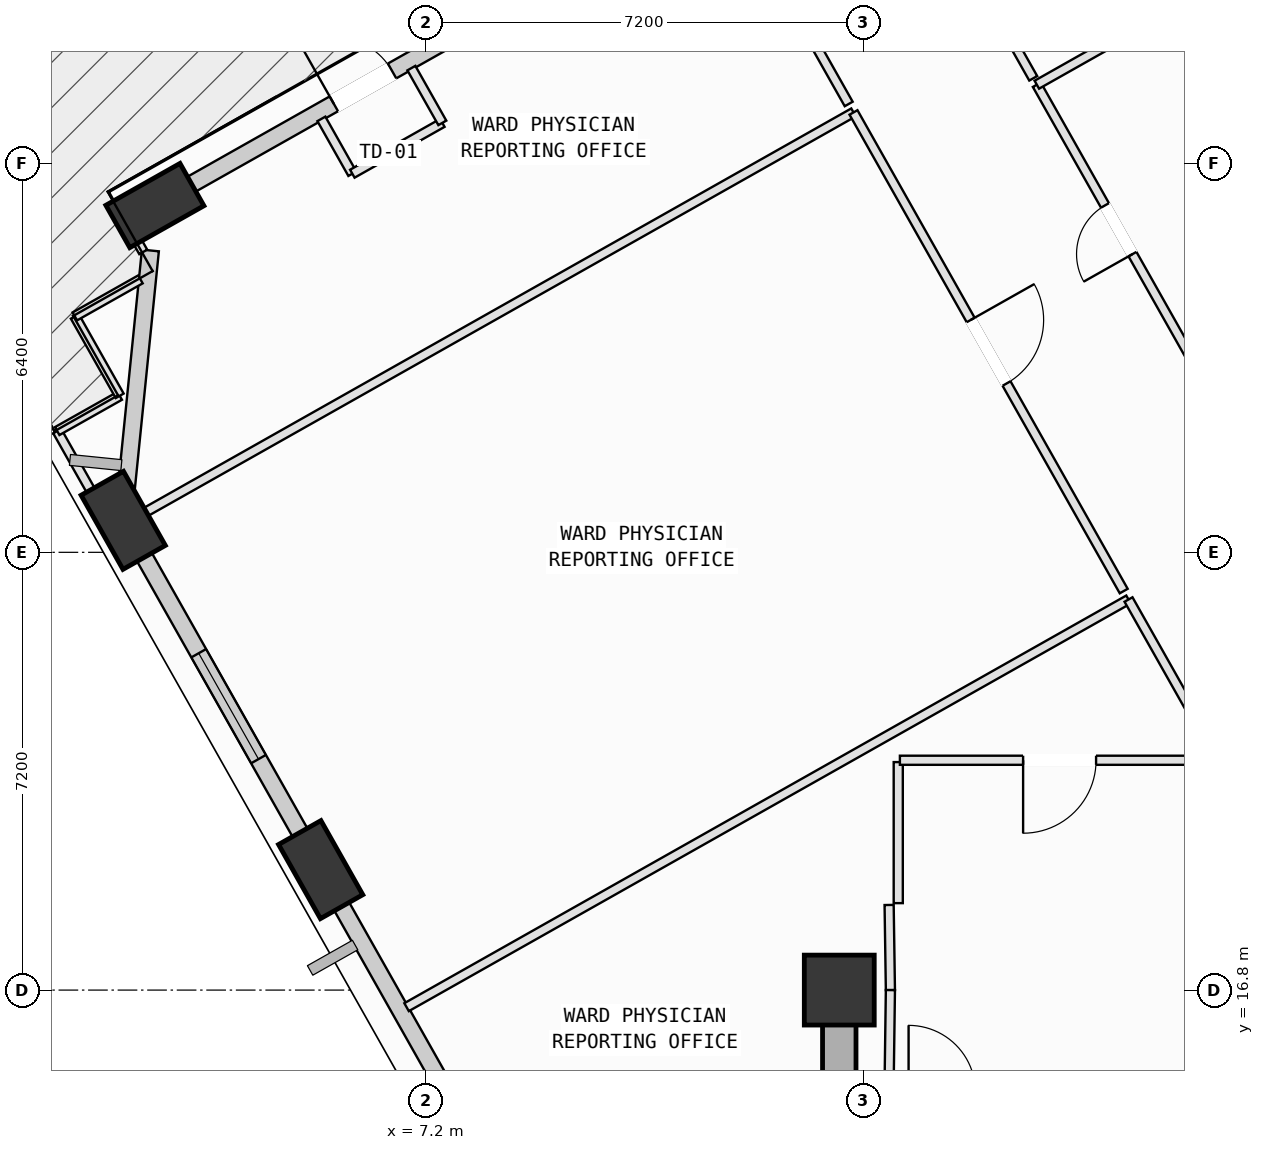
"""IFC4 building model, lengths in metres.
Left out: names, types, materials, properties, quantities, classifications, styles, units other than length and angle.
Written with IfcOpenShell. Run it as: python <this file> out.ifc"""

import sys

from ifc_helpers import new_model, si_unit, direction, frame, frame_2d, origin, origin_2d, place, context, subcontext, project, spatial, rectangle, extrude, element, fill, save


model = new_model("IFC4")
c1 = context("Model", 3, precision=1e-05, world=origin(), true_north=direction((0.0, 1.0)))
c2 = subcontext(c1, "Body", "Model", "MODEL_VIEW")
j1 = project(units=[si_unit("LENGTHUNIT", "METRE"), si_unit("PLANEANGLEUNIT", "RADIAN")], contexts=[c1])
p1 = place(None, origin())
s1 = spatial("IfcSite", under=j1, at=p1, CompositionType="ELEMENT")
p2 = place(p1, origin())
s2 = spatial("IfcBuilding", under=s1, at=p2, CompositionType="ELEMENT")
p3 = place(p2, frame((0.0, 0.0, 149.8)))
s3 = spatial("IfcBuildingStorey", under=s2, at=p3, CompositionType="ELEMENT", Elevation=149.8)
p4 = place(p3, frame((14.0, 16.8, 0.0), z_axis=(0.0, 0.0, 1.0), x_axis=(1.0, 0.0, 0.0)))
e1 = element("IfcColumn", 1, at=p4, inside=s3, PredefinedType="COLUMN", context=c2, shape_type="SweptSolid", body=[
    extrude(rectangle(XDim=1.15, YDim=1.15, at=origin_2d()), origin(), (0.0, 0.0, 1.0), 4.0),
])
p5 = place(p3, frame((2.745, 29.704, 0.091), z_axis=(-0.019150191055, -0.126986218353, 0.991719602776), x_axis=(0.933758447221, 0.352290278892, 0.063140491291)))
e2 = element("IfcColumn", 2, at=p5, inside=s3, PredefinedType="COLUMN", context=c2, shape_type="SweptSolid", body=[
    extrude(rectangle(XDim=1.4, YDim=0.8, at=origin_2d()), origin(), (0.0, 0.0, 1.0), 3.939),
])
p6 = place(p3, frame((2.224, 24.526, 0.106), z_axis=(0.002115181882, -0.128963883582, 0.991647035359), x_axis=(-0.505758577121, 0.855332460621, 0.112314929893)))
e3 = element("IfcColumn", 3, at=p6, inside=s3, PredefinedType="COLUMN", context=c2, shape_type="SweptSolid", body=[
    extrude(rectangle(XDim=1.4, YDim=0.8, at=origin_2d()), origin(), (0.0, 0.0, 1.0), 3.924),
])
p7 = place(p3, frame((5.471, 18.781, 0.098), z_axis=(0.025670958189, -0.115612547775, 0.992962607908), x_axis=(-0.667400379772, 0.737524132822, 0.103125586472)))
e4 = element("IfcColumn", 4, at=p7, inside=s3, PredefinedType="COLUMN", context=c2, shape_type="SweptSolid", body=[
    extrude(rectangle(XDim=1.4, YDim=0.8, at=origin_2d()), origin(), (0.0, 0.0, 1.0), 3.928),
])
p8 = place(p3, frame((3.001, 29.86, 0.0), z_axis=(0.0, 0.0, 1.0), x_axis=(0.87078604554, 0.491662143033, 0.0)))
e5 = element("IfcWall", 5, at=p8, inside=s3, PredefinedType="SOLIDWALL", context=c2, shape_type="SweptSolid", body=[
    extrude(rectangle(XDim=7.27, YDim=0.28, at=frame_2d((3.635, 0.0))), origin(), (0.0, 0.0, 1.0), 3.165),
])
p9 = place(p8, frame((3.085, 0.0, 0.0)))
e6 = element("IfcOpeningElement", 6, at=p9, cuts=e5, PredefinedType="OPENING", context=c2, shape_type="SweptSolid", body=[
    extrude(rectangle(XDim=1.1, YDim=2.15, at=frame_2d((0.55, 1.075))), frame((0.0, 0.15, 0.0), z_axis=(0.0, -1.0, 0.0), x_axis=(1.0, 0.0, 0.0)), (0.0, 0.0, 1.0), 0.3),
])
p10 = place(p3, frame((2.248, 24.775, 0.0), z_axis=(0.0, 0.0, 1.0), x_axis=(0.100485371099, 0.994938535888, 0.0)))
e7 = element("IfcWall", 7, at=p10, inside=s3, PredefinedType="SOLIDWALL", context=c2, shape_type="SweptSolid", body=[
    extrude(rectangle(XDim=4.21, YDim=0.28, at=frame_2d((2.105, 0.0))), origin(), (0.0, 0.0, 1.0), 3.165),
])
p11 = place(p3, frame((5.339, 19.022, 0.0), z_axis=(0.0, 0.0, 1.0), x_axis=(-0.49164265264, 0.870797049894, 0.0)))
e8 = element("IfcWall", 8, at=p11, inside=s3, PredefinedType="SOLIDWALL", context=c2, shape_type="SweptSolid", body=[
    extrude(rectangle(XDim=5.628, YDim=0.28, at=frame_2d((2.814, 0.0))), origin(), (0.0, 0.0, 1.0), 3.165),
])
p12 = place(p11, frame((1.811, 0.0, 0.75)))
e9 = element("IfcOpeningElement", 9, at=p12, cuts=e8, PredefinedType="OPENING", context=c2, shape_type="SweptSolid", body=[
    extrude(rectangle(XDim=2.0, YDim=1.95, at=frame_2d((1.0, 0.975))), frame((0.0, 0.15, 0.0), z_axis=(0.0, -1.0, 0.0), x_axis=(1.0, 0.0, 0.0)), (0.0, 0.0, 1.0), 0.3),
])
p13 = place(p3, frame((8.606, 13.236, 0.0), z_axis=(0.0, 0.0, 1.0), x_axis=(-0.491646579906, 0.870794832591, 0.0)))
e10 = element("IfcWall", 10, at=p13, inside=s3, PredefinedType="SOLIDWALL", context=c2, shape_type="SweptSolid", body=[
    extrude(rectangle(XDim=5.662, YDim=0.28, at=frame_2d((2.831, 0.0))), origin(), (0.0, 0.0, 1.0), 3.165),
])
p14 = place(p13, frame((1.048, 0.0, 0.75)))
e11 = element("IfcOpeningElement", 11, at=p14, cuts=e10, PredefinedType="OPENING", context=c2, shape_type="SweptSolid", body=[
    extrude(rectangle(XDim=1.4, YDim=1.85, at=frame_2d((0.7, 0.925))), frame((0.0, 0.15, 0.0), z_axis=(0.0, -1.0, 0.0), x_axis=(1.0, 0.0, 0.0)), (0.0, 0.0, 1.0), 0.3),
])
p15 = place(p3, frame((14.0, 16.8, 0.0), z_axis=(0.0, 0.0, 1.0), x_axis=(0.0, -1.0, 0.0)))
e12 = element("IfcWall", 12, at=p15, inside=s3, PredefinedType="SHEAR", context=c2, shape_type="SweptSolid", body=[
    extrude(rectangle(XDim=9.0, YDim=0.55, at=frame_2d((4.5, 0.0))), origin(), (0.0, 0.0, 1.0), 3.78),
])
p16 = place(p3, frame((14.97, 20.55, 0.0), z_axis=(0.0, 0.0, 1.0), x_axis=(0.0, -1.0, 0.0)))
e13 = element("IfcWall", 13, at=p16, inside=s3, PredefinedType="PARTITIONING", context=c2, shape_type="SweptSolid", body=[
    extrude(rectangle(XDim=2.32, YDim=0.15, at=frame_2d((1.16, 0.0))), origin(), (0.0, 0.0, 1.0), 2.765),
])
p17 = place(p3, frame((14.82, 18.2, 0.0), z_axis=(0.0, 0.0, 1.0), x_axis=(0.01499656939, -0.99988754513, 0.0)))
e14 = element("IfcWall", 14, at=p17, inside=s3, PredefinedType="PARTITIONING", context=c2, shape_type="SweptSolid", body=[
    extrude(rectangle(XDim=1.4, YDim=0.15, at=frame_2d((0.7, 0.0))), origin(), (0.0, 0.0, 1.0), 3.78),
])
p18 = place(p3, frame((14.841, 16.8, 0.0), z_axis=(0.0, 0.0, 1.0), x_axis=(-0.01363221443, -0.999907077048, 0.0)))
e15 = element("IfcWall", 15, at=p18, inside=s3, PredefinedType="PARTITIONING", context=c2, shape_type="SweptSolid", body=[
    extrude(rectangle(XDim=1.54, YDim=0.15, at=frame_2d((0.77, 0.0))), origin(), (0.0, 0.0, 1.0), 3.78),
])
p19 = place(p3, frame((6.884, 16.519, 0.0), z_axis=(0.0, 0.0, 1.0), x_axis=(0.870744187076, 0.491736271464, 0.0)))
e16 = element("IfcWall", 16, at=p19, inside=s3, PredefinedType="PARTITIONING", context=c2, shape_type="SweptSolid", body=[
    extrude(rectangle(XDim=13.635, YDim=0.15, at=frame_2d((6.818, 0.0))), origin(), (0.0, 0.0, 1.0), 3.78),
])
p20 = place(p3, frame((18.757, 23.224, 0.0), z_axis=(0.0, 0.0, 1.0), x_axis=(0.491673041497, -0.870779891973, 0.0)))
e17 = element("IfcWall", 17, at=p20, inside=s3, PredefinedType="PARTITIONING", context=c2, shape_type="SweptSolid", body=[
    extrude(rectangle(XDim=3.036, YDim=0.15, at=frame_2d((1.518, 0.0))), origin(), (0.0, 0.0, 1.0), 3.78),
])
p21 = place(p3, frame((20.25, 20.58, 0.0), z_axis=(0.0, 0.0, 1.0), x_axis=(-1.0, 0.0, 0.0)))
e18 = element("IfcWall", 18, at=p21, inside=s3, PredefinedType="PARTITIONING", context=c2, shape_type="SweptSolid", body=[
    extrude(rectangle(XDim=5.253, YDim=0.15, at=frame_2d((2.626, 0.0))), origin(), (0.0, 0.0, 1.0), 3.78),
])
p22 = place(p21, frame((2.027, 0.0, 0.0)))
e19 = element("IfcOpeningElement", 19, at=p22, cuts=e18, PredefinedType="OPENING", context=c2, shape_type="SweptSolid", body=[
    extrude(rectangle(XDim=1.2, YDim=2.15, at=frame_2d((0.6, 1.075))), frame((0.0, 0.085, 0.0), z_axis=(0.0, -1.0, 0.0), x_axis=(1.0, 0.0, 0.0)), (0.0, 0.0, 1.0), 0.17),
])
p23 = place(p3, frame((2.06, 24.361, 0.0), z_axis=(0.0, 0.0, 1.0), x_axis=(0.870772215096, 0.491686637419, 0.0)))
e20 = element("IfcWall", 20, at=p23, inside=s3, PredefinedType="PARTITIONING", context=c2, shape_type="SweptSolid", body=[
    extrude(rectangle(XDim=13.98, YDim=0.15, at=frame_2d((6.99, 0.0))), origin(), (0.0, 0.0, 1.0), 3.78),
])
p24 = place(p3, frame((14.234, 31.235, 0.0), z_axis=(0.0, 0.0, 1.0), x_axis=(0.491609563099, -0.870815731065, 0.0)))
e21 = element("IfcWall", 21, at=p24, inside=s3, PredefinedType="PARTITIONING", context=c2, shape_type="SweptSolid", body=[
    extrude(rectangle(XDim=9.04, YDim=0.15, at=frame_2d((4.52, 0.0))), origin(), (0.0, 0.0, 1.0), 3.78),
])
p25 = place(p24, frame((3.92, 0.0, 0.0)))
e22 = element("IfcOpeningElement", 22, at=p25, cuts=e21, PredefinedType="OPENING", context=c2, shape_type="SweptSolid", body=[
    extrude(rectangle(XDim=1.2, YDim=2.15, at=frame_2d((0.6, 1.075))), frame((0.0, 0.085, 0.0), z_axis=(0.0, -1.0, 0.0), x_axis=(1.0, 0.0, 0.0)), (0.0, 0.0, 1.0), 0.17),
])
p26 = place(p3, frame((5.622, 18.053, 0.0), z_axis=(0.0, 0.0, 1.0), x_axis=(-0.491557910724, 0.870844888832, 0.0)))
e23 = element("IfcWall", 23, at=p26, inside=s3, PredefinedType="PARTITIONING", context=c2, shape_type="SweptSolid", body=[
    extrude(rectangle(XDim=0.983, YDim=0.15, at=frame_2d((0.491, 0.0))), origin(), (0.0, 0.0, 1.0), 3.165),
])
p27 = place(p3, frame((2.372, 23.809, 0.0), z_axis=(0.0, 0.0, 1.0), x_axis=(-0.492069943892, 0.870555667558, 0.0)))
e24 = element("IfcWall", 24, at=p27, inside=s3, PredefinedType="PARTITIONING", context=c2, shape_type="SweptSolid", body=[
    extrude(rectangle(XDim=0.634, YDim=0.15, at=frame_2d((0.317, 0.0))), origin(), (0.0, 0.0, 1.0), 3.165),
])
p28 = place(p3, frame((2.553, 28.941, 0.0), z_axis=(0.0, 0.0, 1.0), x_axis=(-0.492379351397, 0.87038070654, 0.0)))
e25 = element("IfcWall", 25, at=p28, inside=s3, PredefinedType="PARTITIONING", context=c2, shape_type="SweptSolid", body=[
    extrude(rectangle(XDim=0.749, YDim=0.15, at=frame_2d((0.375, 0.0))), origin(), (0.0, 0.0, 1.0), 2.765),
])
p29 = place(p3, frame((2.184, 29.593, 0.0), z_axis=(0.0, 0.0, 1.0), x_axis=(0.870940315607, 0.491388814128, 0.0)))
e26 = element("IfcWall", 26, at=p29, inside=s3, PredefinedType="PARTITIONING", context=c2, shape_type="SweptSolid", body=[
    extrude(rectangle(XDim=0.843, YDim=0.15, at=frame_2d((0.421, 0.0))), origin(), (0.0, 0.0, 1.0), 3.78),
])
p30 = place(p3, frame((5.483, 31.129, 0.0), z_axis=(0.0, 0.0, 1.0), x_axis=(0.491536697049, -0.870856862782, 0.0)))
e27 = element("IfcWall", 27, at=p30, inside=s3, PredefinedType="PARTITIONING", context=c2, shape_type="SweptSolid", body=[
    extrude(rectangle(XDim=1.036, YDim=0.15, at=frame_2d((0.518, 0.0))), origin(), (0.0, 0.0, 1.0), 3.78),
])
p31 = place(p3, frame((5.992, 30.227, 0.0), z_axis=(0.0, 0.0, 1.0), x_axis=(0.870707257982, 0.491801658088, 0.0)))
e28 = element("IfcWall", 28, at=p31, inside=s3, PredefinedType="PARTITIONING", context=c2, shape_type="SweptSolid", body=[
    extrude(rectangle(XDim=1.7, YDim=0.15, at=frame_2d((0.85, 0.0))), origin(), (0.0, 0.0, 1.0), 3.78),
])
p32 = place(p3, frame((7.472, 31.063, 0.0), z_axis=(0.0, 0.0, 1.0), x_axis=(-0.491839596701, 0.870685828021, 0.0)))
e29 = element("IfcWall", 29, at=p32, inside=s3, PredefinedType="PARTITIONING", context=c2, shape_type="SweptSolid", body=[
    extrude(rectangle(XDim=1.035, YDim=0.15, at=frame_2d((0.518, 0.0))), origin(), (0.0, 0.0, 1.0), 3.78),
])
p33 = place(p3, frame((12.164, 34.901, 0.0), z_axis=(0.0, 0.0, 1.0), x_axis=(0.491594368038, -0.870824309096, 0.0)))
e30 = element("IfcWall", 30, at=p33, inside=s3, PredefinedType="PARTITIONING", context=c2, shape_type="SweptSolid", body=[
    extrude(rectangle(XDim=4.05, YDim=0.15, at=frame_2d((2.025, 0.0))), origin(), (0.0, 0.0, 1.0), 3.78),
])
p34 = place(p33, frame((1.7, 0.0, 0.0)))
e31 = element("IfcOpeningElement", 31, at=p34, cuts=e30, PredefinedType="OPENING", context=c2, shape_type="SweptSolid", body=[
    extrude(rectangle(XDim=1.2, YDim=2.15, at=frame_2d((0.6, 1.075))), frame((0.0, 0.085, 0.0), z_axis=(0.0, -1.0, 0.0), x_axis=(1.0, 0.0, 0.0)), (0.0, 0.0, 1.0), 0.17),
])
p35 = place(p3, frame((1.982, 24.501, 0.0), z_axis=(0.0, 0.0, 1.0), x_axis=(-0.492132309021, 0.870520413556, 0.0)))
e32 = element("IfcWall", 32, at=p35, inside=s3, PredefinedType="PARTITIONING", context=c2, shape_type="SweptSolid", body=[
    extrude(rectangle(XDim=1.715, YDim=0.15, at=frame_2d((0.857, 0.0))), origin(), (0.0, 0.0, 1.0), 3.78),
])
p36 = place(p3, frame((1.138, 25.994, 0.0), z_axis=(0.0, 0.0, 1.0), x_axis=(0.870928537075, 0.491409689881, 0.0)))
e33 = element("IfcWall", 33, at=p36, inside=s3, PredefinedType="PARTITIONING", context=c2, shape_type="SweptSolid", body=[
    extrude(rectangle(XDim=1.18, YDim=0.15, at=frame_2d((0.59, 0.0))), origin(), (0.0, 0.0, 1.0), 3.78),
])
p37 = place(p3, frame((2.166, 26.574, 0.0), z_axis=(0.0, 0.0, 1.0), x_axis=(-0.492014351651, 0.870587087987, 0.0)))
e34 = element("IfcWall", 34, at=p37, inside=s3, PredefinedType="PARTITIONING", context=c2, shape_type="SweptSolid", body=[
    extrude(rectangle(XDim=1.5, YDim=0.15, at=frame_2d((0.75, 0.0))), origin(), (0.0, 0.0, 1.0), 3.78),
])
p38 = place(p3, frame((1.428, 27.88, 0.0), z_axis=(0.0, 0.0, 1.0), x_axis=(0.870837912581, 0.491570269658, 0.0)))
e35 = element("IfcWall", 35, at=p38, inside=s3, PredefinedType="PARTITIONING", context=c2, shape_type="SweptSolid", body=[
    extrude(rectangle(XDim=1.239, YDim=0.15, at=frame_2d((0.62, 0.0))), origin(), (0.0, 0.0, 1.0), 3.78),
])
p39 = place(p3, frame((19.943, 26.919, 0.0), z_axis=(0.0, 0.0, 1.0), x_axis=(-0.491627062899, 0.870805851511, 0.0)))
e36 = element("IfcWall", 36, at=p39, inside=s3, PredefinedType="PARTITIONING", context=c2, shape_type="SweptSolid", body=[
    extrude(rectangle(XDim=5.48, YDim=0.15, at=frame_2d((2.74, 0.0))), origin(), (0.0, 0.0, 1.0), 3.78),
])
p40 = place(p39, frame((2.28, 0.0, 0.0)))
e37 = element("IfcOpeningElement", 37, at=p40, cuts=e36, PredefinedType="OPENING", context=c2, shape_type="SweptSolid", body=[
    extrude(rectangle(XDim=0.92, YDim=2.1, at=frame_2d((0.46, 1.05))), frame((0.0, 0.085, 0.0), z_axis=(0.0, -1.0, 0.0), x_axis=(1.0, 0.0, 0.0)), (0.0, 0.0, 1.0), 0.17),
])
p41 = place(p3, frame((17.249, 31.691, 0.0), z_axis=(0.0, 0.0, 1.0), x_axis=(0.870728177917, 0.491764618675, 0.0)))
e38 = element("IfcWall", 38, at=p41, inside=s3, PredefinedType="PARTITIONING", context=c2, shape_type="SweptSolid", body=[
    extrude(rectangle(XDim=4.069, YDim=0.15, at=frame_2d((2.035, 0.0))), origin(), (0.0, 0.0, 1.0), 3.78),
])
p42 = place(p3, frame((17.19, 31.796, 0.0), z_axis=(0.0, 0.0, 1.0), x_axis=(-0.49162033615, 0.870809649168, 0.0)))
e39 = element("IfcWall", 39, at=p42, inside=s3, PredefinedType="PARTITIONING", context=c2, shape_type="SweptSolid", body=[
    extrude(rectangle(XDim=5.175, YDim=0.15, at=frame_2d((2.587, 0.0))), origin(), (0.0, 0.0, 1.0), 3.78),
])
p43 = place(p42, frame((2.127, 0.0, 0.0)))
e40 = element("IfcOpeningElement", 40, at=p43, cuts=e39, PredefinedType="OPENING", context=c2, shape_type="SweptSolid", body=[
    extrude(rectangle(XDim=0.92, YDim=2.1, at=frame_2d((0.46, 1.05))), frame((0.0, 0.085, 0.0), z_axis=(0.0, -1.0, 0.0), x_axis=(1.0, 0.0, 0.0)), (0.0, 0.0, 1.0), 0.17),
])
p44 = place(p9, origin())
e41 = element("IfcDoor", 41, at=p44, inside=s3, OperationType="SINGLE_SWING_LEFT", PredefinedType="DOOR", context=c2, shape_type="SweptSolid", body=[
    extrude(rectangle(XDim=1.1, YDim=2.15, at=frame_2d((0.55, 1.075))), frame((0.0, 0.025, 0.0), z_axis=(0.0, -1.0, 0.0), x_axis=(1.0, 0.0, 0.0)), (0.0, 0.0, 1.0), 0.05),
])
fill(e6, e41)
p45 = place(p12, origin())
e42 = element("IfcWindow", 42, at=p45, inside=s3, PartitioningType="SINGLE_PANEL", PredefinedType="WINDOW", context=c2, shape_type="SweptSolid", body=[
    extrude(rectangle(XDim=2.0, YDim=1.95, at=frame_2d((1.0, 0.975))), frame((0.0, 0.03, 0.0), z_axis=(0.0, -1.0, 0.0), x_axis=(1.0, 0.0, 0.0)), (0.0, 0.0, 1.0), 0.06),
])
fill(e9, e42)
p46 = place(p22, origin())
e43 = element("IfcDoor", 43, at=p46, inside=s3, OperationType="SINGLE_SWING_RIGHT", PredefinedType="DOOR", context=c2, shape_type="SweptSolid", body=[
    extrude(rectangle(XDim=1.2, YDim=2.15, at=frame_2d((0.6, 1.075))), frame((0.0, 0.025, 0.0), z_axis=(0.0, -1.0, 0.0), x_axis=(1.0, 0.0, 0.0)), (0.0, 0.0, 1.0), 0.05),
])
fill(e19, e43)
p47 = place(p25, origin())
e44 = element("IfcDoor", 44, at=p47, inside=s3, OperationType="SINGLE_SWING_LEFT", PredefinedType="DOOR", context=c2, shape_type="SweptSolid", body=[
    extrude(rectangle(XDim=1.2, YDim=2.15, at=frame_2d((0.6, 1.075))), frame((0.0, 0.025, 0.0), z_axis=(0.0, -1.0, 0.0), x_axis=(1.0, 0.0, 0.0)), (0.0, 0.0, 1.0), 0.05),
])
fill(e22, e44)
p48 = place(p40, origin())
e45 = element("IfcDoor", 45, at=p48, inside=s3, OperationType="SINGLE_SWING_LEFT", PredefinedType="DOOR", context=c2, shape_type="SweptSolid", body=[
    extrude(rectangle(XDim=0.92, YDim=2.1, at=frame_2d((0.46, 1.05))), frame((0.0, 0.025, 0.0), z_axis=(0.0, -1.0, 0.0), x_axis=(1.0, 0.0, 0.0)), (0.0, 0.0, 1.0), 0.05),
])
fill(e37, e45)
save(model, sys.argv[1])
